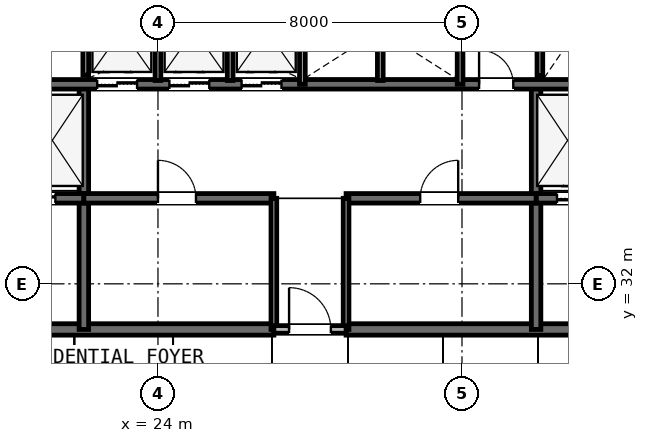
"""IFC4 building model, lengths in metres.
Left out: names, types, materials, properties, quantities, classifications, styles, units other than length and angle.
Written with IfcOpenShell. Run it as: python <this file> out.ifc"""

import sys

from ifc_helpers import new_model, si_unit, direction, frame, frame_2d, origin, place, context, subcontext, project, spatial, rectangle, extrude, element, fill, save


model = new_model("IFC4")
c1 = context("Model", 3, precision=1e-05, world=origin(), true_north=direction((0.0, 1.0)))
c2 = subcontext(c1, "Body", "Model", "MODEL_VIEW")
j1 = project(units=[si_unit("LENGTHUNIT", "METRE"), si_unit("PLANEANGLEUNIT", "RADIAN")], contexts=[c1])
p1 = place(None, origin())
s1 = spatial("IfcSite", under=j1, at=p1, CompositionType="ELEMENT")
p2 = place(p1, origin())
s2 = spatial("IfcBuilding", under=s1, at=p2, CompositionType="ELEMENT")
p3 = place(p2, frame((0.0, 0.0, 279.2)))
s3 = spatial("IfcBuildingStorey", under=s2, at=p3, CompositionType="ELEMENT", Elevation=279.2)
p4 = place(p3, frame((15.85, 30.8, 0.0), z_axis=(0.0, 0.0, 1.0), x_axis=(1.0, 0.0, 0.0)))
e1 = element("IfcWall", 1, at=p4, inside=s3, PredefinedType="SHEAR", context=c2, shape_type="SweptSolid", body=[
    extrude(rectangle(XDim=11.2, YDim=0.3, at=frame_2d((5.6, 0.0))), origin(), (0.0, 0.0, 1.0), 3.8),
])
p5 = place(p4, frame((2.45, 0.0, 0.0)))
e2 = element("IfcOpeningElement", 2, at=p5, cuts=e1, PredefinedType="OPENING", context=c2, shape_type="SweptSolid", body=[
    extrude(rectangle(XDim=1.1, YDim=2.15, at=frame_2d((0.55, 1.075))), frame((0.0, 0.16, 0.0), z_axis=(0.0, -1.0, 0.0), x_axis=(1.0, 0.0, 0.0)), (0.0, 0.0, 1.0), 0.32),
])
p6 = place(p3, frame((28.95, 30.8, 0.0), z_axis=(0.0, 0.0, 1.0), x_axis=(1.0, 0.0, 0.0)))
e3 = element("IfcWall", 3, at=p6, inside=s3, PredefinedType="SHEAR", context=c2, shape_type="SweptSolid", body=[
    extrude(rectangle(XDim=11.2, YDim=0.3, at=frame_2d((5.6, 0.0))), origin(), (0.0, 0.0, 1.0), 3.8),
])
p7 = place(p6, frame((7.65, 0.0, 0.0)))
e4 = element("IfcOpeningElement", 4, at=p7, cuts=e3, PredefinedType="OPENING", context=c2, shape_type="SweptSolid", body=[
    extrude(rectangle(XDim=1.1, YDim=2.15, at=frame_2d((0.55, 1.075))), frame((0.0, 0.16, 0.0), z_axis=(0.0, -1.0, 0.0), x_axis=(1.0, 0.0, 0.0)), (0.0, 0.0, 1.0), 0.32),
])
for number, where, z_axis, x_axis in (
    (5, (22.05, 30.8, 0.0), (0.0, 0.0, 1.0), (0.0, 1.0, 0.0)),
    (6, (33.95, 30.8, 0.0), (0.0, 0.0, 1.0), (0.0, 1.0, 0.0)),
):
    element("IfcWall", number, at=place(p3, frame(where, z_axis=z_axis, x_axis=x_axis)), inside=s3, PredefinedType="SHEAR", context=c2, shape_type="SweptSolid", body=[
        extrude(rectangle(XDim=6.45, YDim=0.25, at=frame_2d((3.225, 0.0))), origin(), (0.0, 0.0, 1.0), 3.8),
    ])
p8 = place(p3, frame((16.0, 34.25, 0.0), z_axis=(0.0, 0.0, 1.0), x_axis=(1.0, 0.0, 0.0)))
e7 = element("IfcWall", 7, at=p8, inside=s3, PredefinedType="SHEAR", context=c2, shape_type="SweptSolid", body=[
    extrude(rectangle(XDim=6.05, YDim=0.25, at=frame_2d((3.025, 0.0))), origin(), (0.0, 0.0, 1.0), 3.8),
])
p9 = place(p8, frame((1.25, 0.0, 0.0)))
e8 = element("IfcOpeningElement", 8, at=p9, cuts=e7, PredefinedType="OPENING", context=c2, shape_type="SweptSolid", body=[
    extrude(rectangle(XDim=1.0, YDim=2.15, at=frame_2d((0.5, 1.075))), frame((0.0, 0.135, 0.0), z_axis=(0.0, -1.0, 0.0), x_axis=(1.0, 0.0, 0.0)), (0.0, 0.0, 1.0), 0.27),
])
p10 = place(p8, frame((4.2, 0.0, 0.0)))
e9 = element("IfcOpeningElement", 9, at=p10, cuts=e7, PredefinedType="OPENING", context=c2, shape_type="SweptSolid", body=[
    extrude(rectangle(XDim=1.1, YDim=2.15, at=frame_2d((0.55, 1.075))), frame((0.0, 0.135, 0.0), z_axis=(0.0, -1.0, 0.0), x_axis=(1.0, 0.0, 0.0)), (0.0, 0.0, 1.0), 0.27),
])
p11 = place(p3, frame((33.95, 34.25, 0.0), z_axis=(0.0, 0.0, 1.0), x_axis=(1.0, 0.0, 0.0)))
e10 = element("IfcWall", 10, at=p11, inside=s3, PredefinedType="SHEAR", context=c2, shape_type="SweptSolid", body=[
    extrude(rectangle(XDim=6.05, YDim=0.25, at=frame_2d((3.025, 0.0))), origin(), (0.0, 0.0, 1.0), 3.8),
])
p12 = place(p11, frame((3.7, 0.0, 0.0)))
e11 = element("IfcOpeningElement", 11, at=p12, cuts=e10, PredefinedType="OPENING", context=c2, shape_type="SweptSolid", body=[
    extrude(rectangle(XDim=1.0, YDim=2.15, at=frame_2d((0.5, 1.075))), frame((0.0, 0.135, 0.0), z_axis=(0.0, -1.0, 0.0), x_axis=(1.0, 0.0, 0.0)), (0.0, 0.0, 1.0), 0.27),
])
p13 = place(p11, frame((0.55, 0.0, 0.0)))
e12 = element("IfcOpeningElement", 12, at=p13, cuts=e10, PredefinedType="OPENING", context=c2, shape_type="SweptSolid", body=[
    extrude(rectangle(XDim=1.1, YDim=2.15, at=frame_2d((0.55, 1.075))), frame((0.0, 0.135, 0.0), z_axis=(0.0, -1.0, 0.0), x_axis=(1.0, 0.0, 0.0)), (0.0, 0.0, 1.0), 0.27),
])
p14 = place(p3, frame((22.05, 34.25, 0.0), z_axis=(0.0, 0.0, 1.0), x_axis=(1.0, 0.0, 0.0)))
e13 = element("IfcWall", 13, at=p14, inside=s3, PredefinedType="SHEAR", context=c2, shape_type="SweptSolid", body=[
    extrude(rectangle(XDim=5.0, YDim=0.25, at=frame_2d((2.5, 0.0))), origin(), (0.0, 0.0, 1.0), 3.8),
])
p15 = place(p14, frame((1.95, 0.0, 0.0)))
e14 = element("IfcOpeningElement", 14, at=p15, cuts=e13, PredefinedType="OPENING", context=c2, shape_type="SweptSolid", body=[
    extrude(rectangle(XDim=1.0, YDim=2.15, at=frame_2d((0.5, 1.075))), frame((0.0, 0.135, 0.0), z_axis=(0.0, -1.0, 0.0), x_axis=(1.0, 0.0, 0.0)), (0.0, 0.0, 1.0), 0.27),
])
p16 = place(p3, frame((28.95, 34.25, 0.0), z_axis=(0.0, 0.0, 1.0), x_axis=(1.0, 0.0, 0.0)))
e15 = element("IfcWall", 15, at=p16, inside=s3, PredefinedType="SHEAR", context=c2, shape_type="SweptSolid", body=[
    extrude(rectangle(XDim=5.0, YDim=0.25, at=frame_2d((2.5, 0.0))), origin(), (0.0, 0.0, 1.0), 3.8),
])
p17 = place(p16, frame((1.95, 0.0, 0.0)))
e16 = element("IfcOpeningElement", 16, at=p17, cuts=e15, PredefinedType="OPENING", context=c2, shape_type="SweptSolid", body=[
    extrude(rectangle(XDim=1.0, YDim=2.15, at=frame_2d((0.5, 1.075))), frame((0.0, 0.135, 0.0), z_axis=(0.0, -1.0, 0.0), x_axis=(1.0, 0.0, 0.0)), (0.0, 0.0, 1.0), 0.27),
])
p18 = place(p3, frame((19.9, 37.25, 0.0), z_axis=(0.0, 0.0, 1.0), x_axis=(1.0, 0.0, 0.0)))
e17 = element("IfcWall", 17, at=p18, inside=s3, PredefinedType="SHEAR", context=c2, shape_type="SweptSolid", body=[
    extrude(rectangle(XDim=16.2, YDim=0.25, at=frame_2d((8.1, 0.0))), origin(), (0.0, 0.0, 1.0), 3.8),
])
p19 = place(p18, frame((12.55, 0.0, 0.0)))
e18 = element("IfcOpeningElement", 18, at=p19, cuts=e17, PredefinedType="OPENING", context=c2, shape_type="SweptSolid", body=[
    extrude(rectangle(XDim=0.9, YDim=2.15, at=frame_2d((0.45, 1.075))), frame((0.0, 0.135, 0.0), z_axis=(0.0, -1.0, 0.0), x_axis=(1.0, 0.0, 0.0)), (0.0, 0.0, 1.0), 0.27),
])
p20 = place(p18, frame((2.5, 0.0, 0.0)))
e19 = element("IfcOpeningElement", 19, at=p20, cuts=e17, PredefinedType="OPENING", context=c2, shape_type="SweptSolid", body=[
    extrude(rectangle(XDim=1.05, YDim=2.15, at=frame_2d((0.525, 1.075))), frame((0.0, 0.135, 0.0), z_axis=(0.0, -1.0, 0.0), x_axis=(1.0, 0.0, 0.0)), (0.0, 0.0, 1.0), 0.27),
])
p21 = place(p18, frame((4.4, 0.0, 0.0)))
e20 = element("IfcOpeningElement", 20, at=p21, cuts=e17, PredefinedType="OPENING", context=c2, shape_type="SweptSolid", body=[
    extrude(rectangle(XDim=1.05, YDim=2.15, at=frame_2d((0.525, 1.075))), frame((0.0, 0.135, 0.0), z_axis=(0.0, -1.0, 0.0), x_axis=(1.0, 0.0, 0.0)), (0.0, 0.0, 1.0), 0.27),
])
p22 = place(p18, frame((6.3, 0.0, 0.0)))
e21 = element("IfcOpeningElement", 21, at=p22, cuts=e17, PredefinedType="OPENING", context=c2, shape_type="SweptSolid", body=[
    extrude(rectangle(XDim=1.05, YDim=2.15, at=frame_2d((0.525, 1.075))), frame((0.0, 0.135, 0.0), z_axis=(0.0, -1.0, 0.0), x_axis=(1.0, 0.0, 0.0)), (0.0, 0.0, 1.0), 0.27),
])
for number, where, z_axis, x_axis in (
    (22, (27.05, 30.8, 0.0), (0.0, 0.0, 1.0), (0.0, 1.0, 0.0)),
    (23, (28.95, 30.8, 0.0), (0.0, 0.0, 1.0), (0.0, 1.0, 0.0)),
):
    element("IfcWall", number, at=place(p3, frame(where, z_axis=z_axis, x_axis=x_axis)), inside=s3, PredefinedType="PLUMBINGWALL", context=c2, shape_type="SweptSolid", body=[
        extrude(rectangle(XDim=3.45, YDim=0.15, at=frame_2d((1.725, 0.0))), origin(), (0.0, 0.0, 1.0), 3.28),
    ])
p23 = place(p3, frame((27.05, 30.8, 0.0), z_axis=(0.0, 0.0, 1.0), x_axis=(1.0, 0.0, 0.0)))
e24 = element("IfcWall", 24, at=p23, inside=s3, PredefinedType="PARTITIONING", context=c2, shape_type="SweptSolid", body=[
    extrude(rectangle(XDim=1.9, YDim=0.2, at=frame_2d((0.95, 0.0))), origin(), (0.0, 0.0, 1.0), 3.28),
])
p24 = place(p23, frame((0.4, 0.0, 0.0)))
e25 = element("IfcOpeningElement", 25, at=p24, cuts=e24, PredefinedType="OPENING", context=c2, shape_type="SweptSolid", body=[
    extrude(rectangle(XDim=1.1, YDim=2.15, at=frame_2d((0.55, 1.075))), frame((0.0, 0.11, 0.0), z_axis=(0.0, -1.0, 0.0), x_axis=(1.0, 0.0, 0.0)), (0.0, 0.0, 1.0), 0.22),
])
p25 = place(p3, frame((22.1, 37.49, 0.0), z_axis=(0.0, 0.0, 1.0), x_axis=(0.0, 1.0, 0.0)))
e26 = element("IfcWall", 26, at=p25, inside=s3, PredefinedType="PLUMBINGWALL", context=c2, shape_type="SweptSolid", body=[
    extrude(rectangle(XDim=2.56, YDim=0.15, at=frame_2d((1.28, 0.0))), origin(), (0.0, 0.0, 1.0), 3.53),
])
p26 = place(p3, frame((27.8, 37.25, 0.0), z_axis=(0.0, 0.0, 1.0), x_axis=(0.0, 1.0, 0.0)))
e27 = element("IfcWall", 27, at=p26, inside=s3, PredefinedType="PLUMBINGWALL", context=c2, shape_type="SweptSolid", body=[
    extrude(rectangle(XDim=2.8, YDim=0.15, at=frame_2d((1.4, 0.0))), origin(), (0.0, 0.0, 1.0), 3.53),
])
for number, where, z_axis, x_axis in (
    (28, (24.0, 37.35, 0.0), (0.0, 0.0, 1.0), (0.0, 1.0, 0.0)),
    (29, (25.9, 37.35, 0.0), (0.0, 0.0, 1.0), (0.0, 1.0, 0.0)),
):
    element("IfcWall", number, at=place(p3, frame(where, z_axis=z_axis, x_axis=x_axis)), inside=s3, PredefinedType="PLUMBINGWALL", context=c2, shape_type="SweptSolid", body=[
        extrude(rectangle(XDim=2.6, YDim=0.15, at=frame_2d((1.3, 0.0))), origin(), (0.0, 0.0, 1.0), 3.53),
    ])
p27 = place(p3, frame((31.95, 37.25, 0.0), z_axis=(0.0, 0.0, 1.0), x_axis=(0.0, 1.0, 0.0)))
e30 = element("IfcWall", 30, at=p27, inside=s3, PredefinedType="PLUMBINGWALL", context=c2, shape_type="SweptSolid", body=[
    extrude(rectangle(XDim=2.8, YDim=0.15, at=frame_2d((1.4, 0.0))), origin(), (0.0, 0.0, 1.0), 3.53),
])
p28 = place(p3, frame((29.85, 37.35, 0.0), z_axis=(0.0, 0.0, 1.0), x_axis=(0.0, 1.0, 0.0)))
e31 = element("IfcWall", 31, at=p28, inside=s3, PredefinedType="PLUMBINGWALL", context=c2, shape_type="SweptSolid", body=[
    extrude(rectangle(XDim=2.6, YDim=0.15, at=frame_2d((1.3, 0.0))), origin(), (0.0, 0.0, 1.0), 3.53),
])
p29 = place(p3, frame((34.05, 37.473, 0.0), z_axis=(0.0, 0.0, 1.0), x_axis=(0.0, 1.0, 0.0)))
e32 = element("IfcWall", 32, at=p29, inside=s3, PredefinedType="PLUMBINGWALL", context=c2, shape_type="SweptSolid", body=[
    extrude(rectangle(XDim=2.577, YDim=0.15, at=frame_2d((1.288, 0.0))), origin(), (0.0, 0.0, 1.0), 3.53),
])
p30 = place(p24, origin())
e33 = element("IfcDoor", 33, at=p30, inside=s3, OperationType="SINGLE_SWING_LEFT", PredefinedType="DOOR", context=c2, shape_type="SweptSolid", body=[
    extrude(rectangle(XDim=1.1, YDim=2.15, at=frame_2d((0.55, 1.075))), frame((0.0, 0.025, 0.0), z_axis=(0.0, -1.0, 0.0), x_axis=(1.0, 0.0, 0.0)), (0.0, 0.0, 1.0), 0.05),
])
fill(e25, e33)
p31 = place(p15, origin())
e34 = element("IfcDoor", 34, at=p31, inside=s3, OperationType="SINGLE_SWING_LEFT", PredefinedType="DOOR", context=c2, shape_type="SweptSolid", body=[
    extrude(rectangle(XDim=1.0, YDim=2.15, at=frame_2d((0.5, 1.075))), frame((0.0, 0.025, 0.0), z_axis=(0.0, -1.0, 0.0), x_axis=(1.0, 0.0, 0.0)), (0.0, 0.0, 1.0), 0.05),
])
fill(e14, e34)
p32 = place(p17, origin())
e35 = element("IfcDoor", 35, at=p32, inside=s3, OperationType="SINGLE_SWING_RIGHT", PredefinedType="DOOR", context=c2, shape_type="SweptSolid", body=[
    extrude(rectangle(XDim=1.0, YDim=2.15, at=frame_2d((0.5, 1.075))), frame((0.0, 0.025, 0.0), z_axis=(0.0, -1.0, 0.0), x_axis=(1.0, 0.0, 0.0)), (0.0, 0.0, 1.0), 0.05),
])
fill(e16, e35)
p33 = place(p19, origin())
e36 = element("IfcDoor", 36, at=p33, inside=s3, OperationType="SINGLE_SWING_LEFT", PredefinedType="DOOR", context=c2, shape_type="SweptSolid", body=[
    extrude(rectangle(XDim=0.9, YDim=2.15, at=frame_2d((0.45, 1.075))), frame((0.0, 0.025, 0.0), z_axis=(0.0, -1.0, 0.0), x_axis=(1.0, 0.0, 0.0)), (0.0, 0.0, 1.0), 0.05),
])
fill(e18, e36)
p34 = place(p10, origin())
e37 = element("IfcDoor", 37, at=p34, inside=s3, OperationType="DOUBLE_DOOR_SLIDING", PredefinedType="DOOR", context=c2, shape_type="SweptSolid", body=[
    extrude(rectangle(XDim=1.1, YDim=2.15, at=frame_2d((0.55, 1.075))), frame((0.0, 0.025, 0.0), z_axis=(0.0, -1.0, 0.0), x_axis=(1.0, 0.0, 0.0)), (0.0, 0.0, 1.0), 0.05),
])
fill(e9, e37)
p35 = place(p13, origin())
e38 = element("IfcDoor", 38, at=p35, inside=s3, OperationType="DOUBLE_DOOR_SLIDING", PredefinedType="DOOR", context=c2, shape_type="SweptSolid", body=[
    extrude(rectangle(XDim=1.1, YDim=2.15, at=frame_2d((0.55, 1.075))), frame((0.0, 0.025, 0.0), z_axis=(0.0, -1.0, 0.0), x_axis=(1.0, 0.0, 0.0)), (0.0, 0.0, 1.0), 0.05),
])
fill(e12, e38)
p36 = place(p20, origin())
e39 = element("IfcDoor", 39, at=p36, inside=s3, OperationType="DOUBLE_DOOR_SLIDING", PredefinedType="DOOR", context=c2, shape_type="SweptSolid", body=[
    extrude(rectangle(XDim=1.05, YDim=2.15, at=frame_2d((0.525, 1.075))), frame((0.0, 0.025, 0.0), z_axis=(0.0, -1.0, 0.0), x_axis=(1.0, 0.0, 0.0)), (0.0, 0.0, 1.0), 0.05),
])
fill(e19, e39)
p37 = place(p21, origin())
e40 = element("IfcDoor", 40, at=p37, inside=s3, OperationType="DOUBLE_DOOR_SLIDING", PredefinedType="DOOR", context=c2, shape_type="SweptSolid", body=[
    extrude(rectangle(XDim=1.05, YDim=2.15, at=frame_2d((0.525, 1.075))), frame((0.0, 0.025, 0.0), z_axis=(0.0, -1.0, 0.0), x_axis=(1.0, 0.0, 0.0)), (0.0, 0.0, 1.0), 0.05),
])
fill(e20, e40)
p38 = place(p22, origin())
e41 = element("IfcDoor", 41, at=p38, inside=s3, OperationType="DOUBLE_DOOR_SLIDING", PredefinedType="DOOR", context=c2, shape_type="SweptSolid", body=[
    extrude(rectangle(XDim=1.05, YDim=2.15, at=frame_2d((0.525, 1.075))), frame((0.0, 0.025, 0.0), z_axis=(0.0, -1.0, 0.0), x_axis=(1.0, 0.0, 0.0)), (0.0, 0.0, 1.0), 0.05),
])
fill(e21, e41)
save(model, sys.argv[1])
